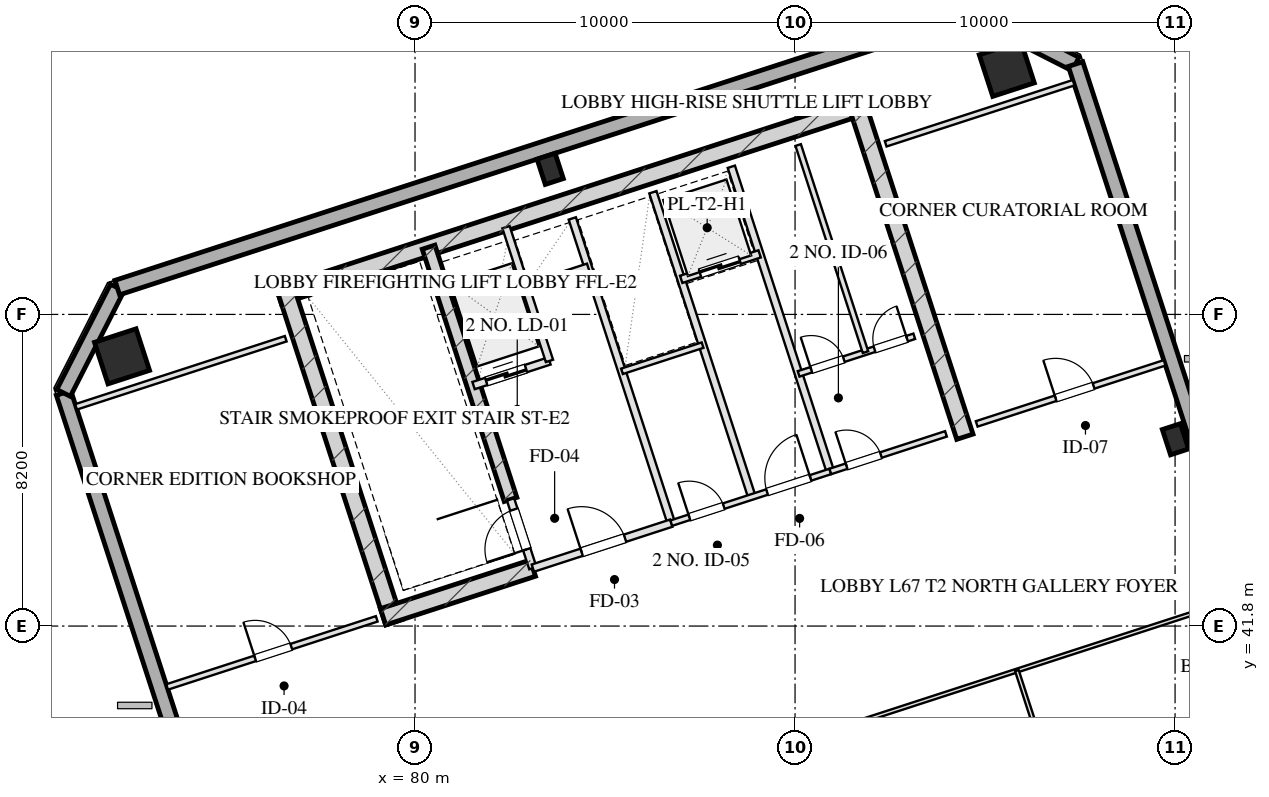
"""IFC4 building model, lengths in metres.
Left out: names, types, materials, properties, quantities, classifications, styles, units other than length and angle.
Written with IfcOpenShell. Run it as: python <this file> out.ifc"""

import sys

from ifc_helpers import new_model, si_unit, direction, frame, frame_2d, origin, origin_2d, place, context, subcontext, project, spatial, rectangle, hollow_rectangle, extrude, element, fill, save


model = new_model("IFC4")
c1 = context("Model", 3, precision=1e-05, world=origin(), true_north=direction((0.0, 1.0)))
c2 = subcontext(c1, "Body", "Model", "MODEL_VIEW")
j1 = project(units=[si_unit("LENGTHUNIT", "METRE"), si_unit("PLANEANGLEUNIT", "RADIAN")], contexts=[c1])
p1 = place(None, origin())
s1 = spatial("IfcSite", under=j1, at=p1, CompositionType="ELEMENT")
p2 = place(p1, origin())
s2 = spatial("IfcBuilding", under=s1, at=p2, CompositionType="ELEMENT")
p3 = place(p2, frame((0.0, 0.0, 247.2)))
s3 = spatial("IfcBuildingStorey", under=s2, at=p3, CompositionType="ELEMENT", Elevation=247.2)
p4 = place(p3, frame((76.415, 50.489, 0.0), z_axis=(0.0, 0.0, 1.0), x_axis=(0.951056810414, 0.309016089169, 0.0)))
e1 = element("IfcWall", 1, at=p4, inside=s3, PredefinedType="SHEAR", context=c2, shape_type="SweptSolid", body=[
    extrude(rectangle(XDim=16.25, YDim=0.45, at=frame_2d((8.125, 0.0))), origin(), (0.0, 0.0, 1.0), 3.2),
])
for number, where, z_axis, x_axis in (
    (2, (79.442, 41.899, 0.0), (0.0, 0.0, 1.0), (-0.309, 0.951, 0.0)),
    (3, (94.469, 46.781, 0.0), (0.0, 0.0, 1.0), (-0.309, 0.951, 0.0)),
):
    element("IfcWall", number, at=place(p3, frame(where, z_axis=z_axis, x_axis=x_axis)), inside=s3, PredefinedType="SHEAR", context=c2, shape_type="SweptSolid", body=[
        extrude(rectangle(XDim=9.33, YDim=0.45, at=frame_2d((4.665, 0.0))), origin(), (0.0, 0.0, 1.0), 3.2),
    ])
p5 = place(p3, frame((82.514, 45.131, 0.0), z_axis=(0.0, 0.0, 1.0), x_axis=(-0.308988790936, 0.951065679686, 0.0)))
e4 = element("IfcWall", 4, at=p5, inside=s3, PredefinedType="SHEAR", context=c2, shape_type="SweptSolid", body=[
    extrude(rectangle(XDim=6.98, YDim=0.35, at=frame_2d((3.49, 0.0))), origin(), (0.0, 0.0, 1.0), 3.2),
])
p6 = place(p3, frame((79.159, 42.043, 0.0), z_axis=(0.0, 0.0, 1.0), x_axis=(0.951047485828, 0.309044785913, 0.0)))
e5 = element("IfcWall", 5, at=p6, inside=s3, PredefinedType="SHEAR", context=c2, shape_type="SweptSolid", body=[
    extrude(rectangle(XDim=4.145, YDim=0.45, at=frame_2d((2.073, 0.0))), origin(), (0.0, 0.0, 1.0), 3.2),
])
for number, where, z_axis, x_axis in (
    (6, (95.572, 56.461, 0.0), (0.0, 0.0, 1.0), (0.951, 0.309, 0.0)),
    (7, (72.29, 48.896, 0.0), (0.0, 0.0, 1.0), (0.951, 0.309, 0.0)),
):
    element("IfcColumn", number, at=place(p3, frame(where, z_axis=z_axis, x_axis=x_axis)), inside=s3, PredefinedType="COLUMN", context=c2, shape_type="SweptSolid", body=[
        extrude(hollow_rectangle(XDim=1.15, YDim=1.15, WallThickness=0.04, at=origin_2d()), origin(), (0.0, 0.0, 1.0), 3.201),
    ])
for number, where, z_axis, x_axis in (
    (8, (100.01, 46.716, 0.0), (0.0, 0.0, 1.0), (0.951, 0.309, 0.0)),
    (9, (83.557, 53.83, 0.0), (0.0, 0.0, 1.0), (0.951, 0.309, 0.0)),
):
    element("IfcColumn", number, at=place(p3, frame(where, z_axis=z_axis, x_axis=x_axis)), inside=s3, PredefinedType="COLUMN", context=c2, shape_type="SweptSolid", body=[
        extrude(hollow_rectangle(XDim=0.5, YDim=0.7, WallThickness=0.025, at=origin_2d()), origin(), (0.0, 0.0, 1.0), 3.201),
    ])
p7 = place(p3, frame((82.618, 11.414, 0.0), z_axis=(0.0, 0.0, 1.0), x_axis=(-0.309016491071, 0.951056679828, 0.0)))
e10 = element("IfcWall", 10, at=p7, inside=s3, PredefinedType="SOLIDWALL", context=c2, shape_type="SweptSolid", body=[
    extrude(rectangle(XDim=38.4, YDim=0.4, at=frame_2d((19.2, 0.0))), origin(), (0.0, 0.0, 1.0), 2.36),
])
p8 = place(p7, frame((11.825, 0.0, 0.75)))
e11 = element("IfcOpeningElement", 11, at=p8, cuts=e10, PredefinedType="OPENING", context=c2, shape_type="SweptSolid", body=[
    extrude(rectangle(XDim=1.95, YDim=1.21, at=frame_2d((0.975, 0.605))), frame((0.0, 0.21, 0.0), z_axis=(0.0, -1.0, 0.0), x_axis=(1.0, 0.0, 0.0)), (0.0, 0.0, 1.0), 0.42),
])
p9 = place(p7, frame((15.625, 0.0, 0.75)))
e12 = element("IfcOpeningElement", 12, at=p9, cuts=e10, PredefinedType="OPENING", context=c2, shape_type="SweptSolid", body=[
    extrude(rectangle(XDim=1.95, YDim=1.21, at=frame_2d((0.975, 0.605))), frame((0.0, 0.21, 0.0), z_axis=(0.0, -1.0, 0.0), x_axis=(1.0, 0.0, 0.0)), (0.0, 0.0, 1.0), 0.42),
])
p10 = place(p7, frame((21.5, 0.0, 0.0)))
e13 = element("IfcOpeningElement", 13, at=p10, cuts=e10, PredefinedType="OPENING", context=c2, shape_type="SweptSolid", body=[
    extrude(rectangle(XDim=1.1, YDim=2.15, at=frame_2d((0.55, 1.075))), frame((0.0, 0.21, 0.0), z_axis=(0.0, -1.0, 0.0), x_axis=(1.0, 0.0, 0.0)), (0.0, 0.0, 1.0), 0.42),
])
p11 = place(p3, frame((70.752, 47.934, 0.0), z_axis=(0.0, 0.0, 1.0), x_axis=(0.453949291228, 0.891027519774, 0.0)))
e14 = element("IfcWall", 14, at=p11, inside=s3, PredefinedType="SOLIDWALL", context=c2, shape_type="SweptSolid", body=[
    extrude(rectangle(XDim=3.111, YDim=0.4, at=frame_2d((1.556, 0.0))), origin(), (0.0, 0.0, 1.0), 2.36),
])
p12 = place(p3, frame((72.165, 50.706, 0.0), z_axis=(0.0, 0.0, 1.0), x_axis=(0.951058012937, 0.309012388148, 0.0)))
e15 = element("IfcWall", 15, at=p12, inside=s3, PredefinedType="SOLIDWALL", context=c2, shape_type="SweptSolid", body=[
    extrude(rectangle(XDim=23.6, YDim=0.4, at=frame_2d((11.8, 0.0))), origin(), (0.0, 0.0, 1.0), 2.36),
])
p13 = place(p3, frame((94.61, 57.999, 0.0), z_axis=(0.0, 0.0, 1.0), x_axis=(0.890979603174, -0.454043331334, 0.0)))
e16 = element("IfcWall", 16, at=p13, inside=s3, PredefinedType="SOLIDWALL", context=c2, shape_type="SweptSolid", body=[
    extrude(rectangle(XDim=3.111, YDim=0.4, at=frame_2d((1.556, 0.0))), origin(), (0.0, 0.0, 1.0), 2.36),
])
p14 = place(p3, frame((97.382, 56.586, 0.0), z_axis=(0.0, 0.0, 1.0), x_axis=(0.309016491071, -0.951056679828, 0.0)))
e17 = element("IfcWall", 17, at=p14, inside=s3, PredefinedType="SOLIDWALL", context=c2, shape_type="SweptSolid", body=[
    extrude(rectangle(XDim=38.4, YDim=0.4, at=frame_2d((19.2, 0.0))), origin(), (0.0, 0.0, 1.0), 2.36),
])
p15 = place(p14, frame((24.625, 0.0, 0.75)))
e18 = element("IfcOpeningElement", 18, at=p15, cuts=e17, PredefinedType="OPENING", context=c2, shape_type="SweptSolid", body=[
    extrude(rectangle(XDim=1.95, YDim=1.21, at=frame_2d((0.975, 0.605))), frame((0.0, 0.21, 0.0), z_axis=(0.0, -1.0, 0.0), x_axis=(1.0, 0.0, 0.0)), (0.0, 0.0, 1.0), 0.42),
])
p16 = place(p14, frame((20.825, 0.0, 0.75)))
e19 = element("IfcOpeningElement", 19, at=p16, cuts=e17, PredefinedType="OPENING", context=c2, shape_type="SweptSolid", body=[
    extrude(rectangle(XDim=1.95, YDim=1.21, at=frame_2d((0.975, 0.605))), frame((0.0, 0.21, 0.0), z_axis=(0.0, -1.0, 0.0), x_axis=(1.0, 0.0, 0.0)), (0.0, 0.0, 1.0), 0.42),
])
p17 = place(p14, frame((15.8, 0.0, 0.0)))
e20 = element("IfcOpeningElement", 20, at=p17, cuts=e17, PredefinedType="OPENING", context=c2, shape_type="SweptSolid", body=[
    extrude(rectangle(XDim=1.1, YDim=2.15, at=frame_2d((0.55, 1.075))), frame((0.0, 0.21, 0.0), z_axis=(0.0, -1.0, 0.0), x_axis=(1.0, 0.0, 0.0)), (0.0, 0.0, 1.0), 0.42),
])
p18 = place(p3, frame((83.101, 43.324, 0.0), z_axis=(0.0, 0.0, 1.0), x_axis=(-0.309048298632, 0.951046344356, 0.0)))
e21 = element("IfcWall", 21, at=p18, inside=s3, PredefinedType="PARTITIONING", context=c2, shape_type="SweptSolid", body=[
    extrude(rectangle(XDim=1.9, YDim=0.2, at=frame_2d((0.95, 0.0))), origin(), (0.0, 0.0, 1.0), 2.925),
])
p19 = place(p18, frame((0.52, 0.0, 0.0)))
e22 = element("IfcOpeningElement", 22, at=p19, cuts=e21, PredefinedType="OPENING", context=c2, shape_type="SweptSolid", body=[
    extrude(rectangle(XDim=1.1, YDim=2.05, at=frame_2d((0.55, 1.025))), frame((0.0, 0.11, 0.0), z_axis=(0.0, -1.0, 0.0), x_axis=(1.0, 0.0, 0.0)), (0.0, 0.0, 1.0), 0.22),
])
p20 = place(p3, frame((86.743, 44.508, 0.0), z_axis=(0.0, 0.0, 1.0), x_axis=(-0.309016001439, 0.951056838919, 0.0)))
e23 = element("IfcWall", 23, at=p20, inside=s3, PredefinedType="PARTITIONING", context=c2, shape_type="SweptSolid", body=[
    extrude(rectangle(XDim=8.43, YDim=0.2, at=frame_2d((4.215, 0.0))), origin(), (0.0, 0.0, 1.0), 2.565),
])
p21 = place(p3, frame((83.101, 43.324, 0.0), z_axis=(0.0, 0.0, 1.0), x_axis=(0.951052804469, 0.309028417967, 0.0)))
e24 = element("IfcWall", 24, at=p21, inside=s3, PredefinedType="PARTITIONING", context=c2, shape_type="SweptSolid", body=[
    extrude(rectangle(XDim=3.83, YDim=0.2, at=frame_2d((1.915, 0.0))), origin(), (0.0, 0.0, 1.0), 2.925),
])
p22 = place(p21, frame((1.35, 0.0, 0.0)))
e25 = element("IfcOpeningElement", 25, at=p22, cuts=e24, PredefinedType="OPENING", context=c2, shape_type="SweptSolid", body=[
    extrude(rectangle(XDim=1.2, YDim=2.05, at=frame_2d((0.6, 1.025))), frame((0.0, 0.11, 0.0), z_axis=(0.0, -1.0, 0.0), x_axis=(1.0, 0.0, 0.0)), (0.0, 0.0, 1.0), 0.22),
])
p23 = place(p3, frame((81.54, 48.127, 0.0), z_axis=(0.0, 0.0, 1.0), x_axis=(0.951062257173, 0.308999325213, 0.0)))
e26 = element("IfcWall", 26, at=p23, inside=s3, PredefinedType="PARTITIONING", context=c2, shape_type="SweptSolid", body=[
    extrude(rectangle(XDim=2.1, YDim=0.2, at=frame_2d((1.05, 0.0))), origin(), (0.0, 0.0, 1.0), 2.925),
])
p24 = place(p23, frame((0.35, 0.0, 0.0)))
e27 = element("IfcOpeningElement", 27, at=p24, cuts=e26, PredefinedType="OPENING", context=c2, shape_type="SweptSolid", body=[
    extrude(rectangle(XDim=1.1, YDim=2.05, at=frame_2d((0.55, 1.025))), frame((0.0, 0.11, 0.0), z_axis=(0.0, -1.0, 0.0), x_axis=(1.0, 0.0, 0.0)), (0.0, 0.0, 1.0), 0.22),
])
p25 = place(p3, frame((83.538, 48.776, 0.0), z_axis=(0.0, 0.0, 1.0), x_axis=(-0.3089935693, 0.951064127245, 0.0)))
e28 = element("IfcWall", 28, at=p25, inside=s3, PredefinedType="PARTITIONING", context=c2, shape_type="SweptSolid", body=[
    extrude(rectangle(XDim=3.7, YDim=0.2, at=frame_2d((1.85, 0.0))), origin(), (0.0, 0.0, 1.0), 2.925),
])
p26 = place(p3, frame((82.91, 50.707, 0.0), z_axis=(0.0, 0.0, 1.0), x_axis=(0.951041328149, 0.309063734775, 0.0)))
e29 = element("IfcWall", 29, at=p26, inside=s3, PredefinedType="PARTITIONING", context=c2, shape_type="SweptSolid", body=[
    extrude(rectangle(XDim=1.73, YDim=0.2, at=frame_2d((0.865, 0.0))), origin(), (0.0, 0.0, 1.0), 2.925),
])
p27 = place(p3, frame((90.928, 45.868, 0.0), z_axis=(0.0, 0.0, 1.0), x_axis=(-0.309042196757, 0.951048327176, 0.0)))
e30 = element("IfcWall", 30, at=p27, inside=s3, PredefinedType="PARTITIONING", context=c2, shape_type="SweptSolid", body=[
    extrude(rectangle(XDim=8.43, YDim=0.2, at=frame_2d((4.215, 0.0))), origin(), (0.0, 0.0, 1.0), 2.925),
])
p28 = place(p3, frame((88.864, 45.197, 0.0), z_axis=(0.0, 0.0, 1.0), x_axis=(-0.309007490203, 0.951059604335, 0.0)))
e31 = element("IfcWall", 31, at=p28, inside=s3, PredefinedType="PARTITIONING", context=c2, shape_type="SweptSolid", body=[
    extrude(rectangle(XDim=8.43, YDim=0.2, at=frame_2d((4.215, 0.0))), origin(), (0.0, 0.0, 1.0), 2.925),
])
p29 = place(p3, frame((86.743, 44.508, 0.0), z_axis=(0.0, 0.0, 1.0), x_axis=(0.951063829732, 0.308994485023, 0.0)))
e32 = element("IfcWall", 32, at=p29, inside=s3, PredefinedType="PARTITIONING", context=c2, shape_type="SweptSolid", body=[
    extrude(rectangle(XDim=4.4, YDim=0.15, at=frame_2d((2.2, 0.0))), origin(), (0.0, 0.0, 1.0), 2.925),
])
p30 = place(p29, frame((0.5, 0.0, 0.0)))
e33 = element("IfcOpeningElement", 33, at=p30, cuts=e32, PredefinedType="OPENING", context=c2, shape_type="SweptSolid", body=[
    extrude(rectangle(XDim=0.95, YDim=2.05, at=frame_2d((0.475, 1.025))), frame((0.0, 0.085, 0.0), z_axis=(0.0, -1.0, 0.0), x_axis=(1.0, 0.0, 0.0)), (0.0, 0.0, 1.0), 0.17),
])
p31 = place(p29, frame((2.65, 0.0, 0.0)))
e34 = element("IfcOpeningElement", 34, at=p31, cuts=e32, PredefinedType="OPENING", context=c2, shape_type="SweptSolid", body=[
    extrude(rectangle(XDim=1.2, YDim=2.05, at=frame_2d((0.6, 1.025))), frame((0.0, 0.085, 0.0), z_axis=(0.0, -1.0, 0.0), x_axis=(1.0, 0.0, 0.0)), (0.0, 0.0, 1.0), 0.17),
])
p32 = place(p3, frame((85.446, 48.502, 0.0), z_axis=(0.0, 0.0, 1.0), x_axis=(0.951075093106, 0.308959814982, 0.0)))
e35 = element("IfcWall", 35, at=p32, inside=s3, PredefinedType="PARTITIONING", context=c2, shape_type="SweptSolid", body=[
    extrude(rectangle(XDim=2.23, YDim=0.15, at=frame_2d((1.115, 0.0))), origin(), (0.0, 0.0, 1.0), 2.925),
])
p33 = place(p3, frame((87.004, 50.922, 0.0), z_axis=(0.0, 0.0, 1.0), x_axis=(0.951041509718, 0.309063176055, 0.0)))
e36 = element("IfcWall", 36, at=p33, inside=s3, PredefinedType="PARTITIONING", context=c2, shape_type="SweptSolid", body=[
    extrude(rectangle(XDim=2.17, YDim=0.2, at=frame_2d((1.085, 0.0))), origin(), (0.0, 0.0, 1.0), 2.925),
])
p34 = place(p33, frame((0.52, 0.0, 0.0)))
e37 = element("IfcOpeningElement", 37, at=p34, cuts=e36, PredefinedType="OPENING", context=c2, shape_type="SweptSolid", body=[
    extrude(rectangle(XDim=1.1, YDim=2.05, at=frame_2d((0.55, 1.025))), frame((0.0, 0.11, 0.0), z_axis=(0.0, -1.0, 0.0), x_axis=(1.0, 0.0, 0.0)), (0.0, 0.0, 1.0), 0.22),
])
p35 = place(p3, frame((90.928, 45.868, 0.0), z_axis=(0.0, 0.0, 1.0), x_axis=(0.951059297078, 0.309008435874, 0.0)))
e38 = element("IfcWall", 38, at=p35, inside=s3, PredefinedType="PARTITIONING", context=c2, shape_type="SweptSolid", body=[
    extrude(rectangle(XDim=3.2, YDim=0.15, at=frame_2d((1.6, 0.0))), origin(), (0.0, 0.0, 1.0), 2.925),
])
p36 = place(p35, frame((0.45, 0.0, 0.0)))
e39 = element("IfcOpeningElement", 39, at=p36, cuts=e38, PredefinedType="OPENING", context=c2, shape_type="SweptSolid", body=[
    extrude(rectangle(XDim=0.95, YDim=2.05, at=frame_2d((0.475, 1.025))), frame((0.0, 0.085, 0.0), z_axis=(0.0, -1.0, 0.0), x_axis=(1.0, 0.0, 0.0)), (0.0, 0.0, 1.0), 0.17),
])
p37 = place(p3, frame((90.094, 48.436, 0.0), z_axis=(0.0, 0.0, 1.0), x_axis=(0.951066581729, 0.308986014439, 0.0)))
e40 = element("IfcWall", 40, at=p37, inside=s3, PredefinedType="PARTITIONING", context=c2, shape_type="SweptSolid", body=[
    extrude(rectangle(XDim=3.2, YDim=0.15, at=frame_2d((1.6, 0.0))), origin(), (0.0, 0.0, 1.0), 2.925),
])
p38 = place(p37, frame((0.35, 0.0, 0.0)))
e41 = element("IfcOpeningElement", 41, at=p38, cuts=e40, PredefinedType="OPENING", context=c2, shape_type="SweptSolid", body=[
    extrude(rectangle(XDim=0.9, YDim=2.05, at=frame_2d((0.45, 1.025))), frame((0.0, 0.085, 0.0), z_axis=(0.0, -1.0, 0.0), x_axis=(1.0, 0.0, 0.0)), (0.0, 0.0, 1.0), 0.17),
])
p39 = place(p37, frame((2.1, 0.0, 0.0)))
e42 = element("IfcOpeningElement", 42, at=p39, cuts=e40, PredefinedType="OPENING", context=c2, shape_type="SweptSolid", body=[
    extrude(rectangle(XDim=0.9, YDim=2.05, at=frame_2d((0.45, 1.025))), frame((0.0, 0.085, 0.0), z_axis=(0.0, -1.0, 0.0), x_axis=(1.0, 0.0, 0.0)), (0.0, 0.0, 1.0), 0.17),
])
p40 = place(p3, frame((91.853, 49.007, 0.0), z_axis=(0.0, 0.0, 1.0), x_axis=(-0.309022487551, 0.951054731437, 0.0)))
e43 = element("IfcWall", 43, at=p40, inside=s3, PredefinedType="PARTITIONING", context=c2, shape_type="SweptSolid", body=[
    extrude(rectangle(XDim=5.73, YDim=0.15, at=frame_2d((2.865, 0.0))), origin(), (0.0, 0.0, 1.0), 2.925),
])
p41 = place(p3, frame((71.081, 47.568, 0.0), z_axis=(0.0, 0.0, 1.0), x_axis=(0.951059431056, 0.309008023519, 0.0)))
e44 = element("IfcWall", 44, at=p41, inside=s3, PredefinedType="PARTITIONING", context=c2, shape_type="SweptSolid", body=[
    extrude(rectangle(XDim=5.8, YDim=0.15, at=frame_2d((2.9, 0.0))), origin(), (0.0, 0.0, 1.0), 2.925),
])
p42 = place(p3, frame((73.476, 40.197, 0.0), z_axis=(0.0, 0.0, 1.0), x_axis=(0.951059431056, 0.309008023519, 0.0)))
e45 = element("IfcWall", 45, at=p42, inside=s3, PredefinedType="PARTITIONING", context=c2, shape_type="SweptSolid", body=[
    extrude(rectangle(XDim=5.8, YDim=0.15, at=frame_2d((2.9, 0.0))), origin(), (0.0, 0.0, 1.0), 2.925),
])
p43 = place(p42, frame((2.436, 0.0, 0.0)))
e46 = element("IfcOpeningElement", 46, at=p43, cuts=e45, PredefinedType="OPENING", context=c2, shape_type="SweptSolid", body=[
    extrude(rectangle(XDim=1.0, YDim=2.05, at=frame_2d((0.5, 1.025))), frame((0.0, 0.085, 0.0), z_axis=(0.0, -1.0, 0.0), x_axis=(1.0, 0.0, 0.0)), (0.0, 0.0, 1.0), 0.17),
])
p44 = place(p3, frame((92.385, 54.49, 0.0), z_axis=(0.0, 0.0, 1.0), x_axis=(0.951055112834, 0.309021313752, 0.0)))
e47 = element("IfcWall", 47, at=p44, inside=s3, PredefinedType="PARTITIONING", context=c2, shape_type="SweptSolid", body=[
    extrude(rectangle(XDim=5.2, YDim=0.15, at=frame_2d((2.6, 0.0))), origin(), (0.0, 0.0, 1.0), 2.925),
])
p45 = place(p3, frame((94.78, 47.119, 0.0), z_axis=(0.0, 0.0, 1.0), x_axis=(0.951055112834, 0.309021313752, 0.0)))
e48 = element("IfcWall", 48, at=p45, inside=s3, PredefinedType="PARTITIONING", context=c2, shape_type="SweptSolid", body=[
    extrude(rectangle(XDim=5.2, YDim=0.15, at=frame_2d((2.6, 0.0))), origin(), (0.0, 0.0, 1.0), 2.925),
])
p46 = place(p45, frame((2.184, 0.0, 0.0)))
e49 = element("IfcOpeningElement", 49, at=p46, cuts=e48, PredefinedType="OPENING", context=c2, shape_type="SweptSolid", body=[
    extrude(rectangle(XDim=1.05, YDim=2.05, at=frame_2d((0.525, 1.025))), frame((0.0, 0.085, 0.0), z_axis=(0.0, -1.0, 0.0), x_axis=(1.0, 0.0, 0.0)), (0.0, 0.0, 1.0), 0.17),
])
p47 = place(p3, frame((91.296, 39.153, 0.0), z_axis=(0.0, 0.0, 1.0), x_axis=(0.951058423821, 0.309011123554, 0.0)))
e50 = element("IfcWall", 50, at=p47, inside=s3, PredefinedType="MOVABLE", context=c2, shape_type="SweptSolid", body=[
    extrude(rectangle(XDim=10.975, YDim=0.1, at=frame_2d((5.487, 0.0))), origin(), (0.0, 0.0, 1.0), 2.925),
])
p48 = place(p3, frame((98.619, 32.069, 0.0), z_axis=(0.0, 0.0, 1.0), x_axis=(-0.309032706929, 0.951051410833, 0.0)))
e51 = element("IfcWall", 51, at=p48, inside=s3, PredefinedType="MOVABLE", context=c2, shape_type="SweptSolid", body=[
    extrude(rectangle(XDim=9.0, YDim=0.1, at=frame_2d((4.5, 0.0))), origin(), (0.0, 0.0, 1.0), 2.925),
])
p49 = place(p19, origin())
e52 = element("IfcDoor", 52, at=p49, inside=s3, OperationType="SINGLE_SWING_LEFT", PredefinedType="DOOR", context=c2, shape_type="SweptSolid", body=[
    extrude(rectangle(XDim=1.1, YDim=2.05, at=frame_2d((0.55, 1.025))), frame((0.0, 0.025, 0.0), z_axis=(0.0, -1.0, 0.0), x_axis=(1.0, 0.0, 0.0)), (0.0, 0.0, 1.0), 0.05),
])
fill(e22, e52)
p50 = place(p22, origin())
e53 = element("IfcDoor", 53, at=p50, inside=s3, OperationType="SINGLE_SWING_LEFT", PredefinedType="DOOR", context=c2, shape_type="SweptSolid", body=[
    extrude(rectangle(XDim=1.2, YDim=2.05, at=frame_2d((0.6, 1.025))), frame((0.0, 0.025, 0.0), z_axis=(0.0, -1.0, 0.0), x_axis=(1.0, 0.0, 0.0)), (0.0, 0.0, 1.0), 0.05),
])
fill(e25, e53)
p51 = place(p24, origin())
e54 = element("IfcDoor", 54, at=p51, inside=s3, OperationType="DOUBLE_DOOR_SLIDING", PredefinedType="DOOR", context=c2, shape_type="SweptSolid", body=[
    extrude(rectangle(XDim=1.1, YDim=2.05, at=frame_2d((0.55, 1.025))), frame((0.0, 0.025, 0.0), z_axis=(0.0, -1.0, 0.0), x_axis=(1.0, 0.0, 0.0)), (0.0, 0.0, 1.0), 0.05),
])
fill(e27, e54)
p52 = place(p30, origin())
e55 = element("IfcDoor", 55, at=p52, inside=s3, OperationType="SINGLE_SWING_LEFT", PredefinedType="DOOR", context=c2, shape_type="SweptSolid", body=[
    extrude(rectangle(XDim=0.95, YDim=2.05, at=frame_2d((0.475, 1.025))), frame((0.0, 0.025, 0.0), z_axis=(0.0, -1.0, 0.0), x_axis=(1.0, 0.0, 0.0)), (0.0, 0.0, 1.0), 0.05),
])
fill(e33, e55)
p53 = place(p31, origin())
e56 = element("IfcDoor", 56, at=p53, inside=s3, OperationType="SINGLE_SWING_RIGHT", PredefinedType="DOOR", context=c2, shape_type="SweptSolid", body=[
    extrude(rectangle(XDim=1.2, YDim=2.05, at=frame_2d((0.6, 1.025))), frame((0.0, 0.025, 0.0), z_axis=(0.0, -1.0, 0.0), x_axis=(1.0, 0.0, 0.0)), (0.0, 0.0, 1.0), 0.05),
])
fill(e34, e56)
p54 = place(p34, origin())
e57 = element("IfcDoor", 57, at=p54, inside=s3, OperationType="DOUBLE_DOOR_SLIDING", PredefinedType="DOOR", context=c2, shape_type="SweptSolid", body=[
    extrude(rectangle(XDim=1.1, YDim=2.05, at=frame_2d((0.55, 1.025))), frame((0.0, 0.025, 0.0), z_axis=(0.0, -1.0, 0.0), x_axis=(1.0, 0.0, 0.0)), (0.0, 0.0, 1.0), 0.05),
])
fill(e37, e57)
p55 = place(p36, origin())
e58 = element("IfcDoor", 58, at=p55, inside=s3, OperationType="SINGLE_SWING_LEFT", PredefinedType="DOOR", context=c2, shape_type="SweptSolid", body=[
    extrude(rectangle(XDim=0.95, YDim=2.05, at=frame_2d((0.475, 1.025))), frame((0.0, 0.025, 0.0), z_axis=(0.0, -1.0, 0.0), x_axis=(1.0, 0.0, 0.0)), (0.0, 0.0, 1.0), 0.05),
])
fill(e39, e58)
p56 = place(p38, origin())
e59 = element("IfcDoor", 59, at=p56, inside=s3, OperationType="SINGLE_SWING_LEFT", PredefinedType="DOOR", context=c2, shape_type="SweptSolid", body=[
    extrude(rectangle(XDim=0.9, YDim=2.05, at=frame_2d((0.45, 1.025))), frame((0.0, 0.025, 0.0), z_axis=(0.0, -1.0, 0.0), x_axis=(1.0, 0.0, 0.0)), (0.0, 0.0, 1.0), 0.05),
])
fill(e41, e59)
p57 = place(p39, origin())
e60 = element("IfcDoor", 60, at=p57, inside=s3, OperationType="SINGLE_SWING_RIGHT", PredefinedType="DOOR", context=c2, shape_type="SweptSolid", body=[
    extrude(rectangle(XDim=0.9, YDim=2.05, at=frame_2d((0.45, 1.025))), frame((0.0, 0.025, 0.0), z_axis=(0.0, -1.0, 0.0), x_axis=(1.0, 0.0, 0.0)), (0.0, 0.0, 1.0), 0.05),
])
fill(e42, e60)
p58 = place(p43, origin())
e61 = element("IfcDoor", 61, at=p58, inside=s3, OperationType="SINGLE_SWING_LEFT", PredefinedType="DOOR", context=c2, shape_type="SweptSolid", body=[
    extrude(rectangle(XDim=1.0, YDim=2.05, at=frame_2d((0.5, 1.025))), frame((0.0, 0.025, 0.0), z_axis=(0.0, -1.0, 0.0), x_axis=(1.0, 0.0, 0.0)), (0.0, 0.0, 1.0), 0.05),
])
fill(e46, e61)
p59 = place(p46, origin())
e62 = element("IfcDoor", 62, at=p59, inside=s3, OperationType="SINGLE_SWING_LEFT", PredefinedType="DOOR", context=c2, shape_type="SweptSolid", body=[
    extrude(rectangle(XDim=1.05, YDim=2.05, at=frame_2d((0.525, 1.025))), frame((0.0, 0.025, 0.0), z_axis=(0.0, -1.0, 0.0), x_axis=(1.0, 0.0, 0.0)), (0.0, 0.0, 1.0), 0.05),
])
fill(e49, e62)
save(model, sys.argv[1])
